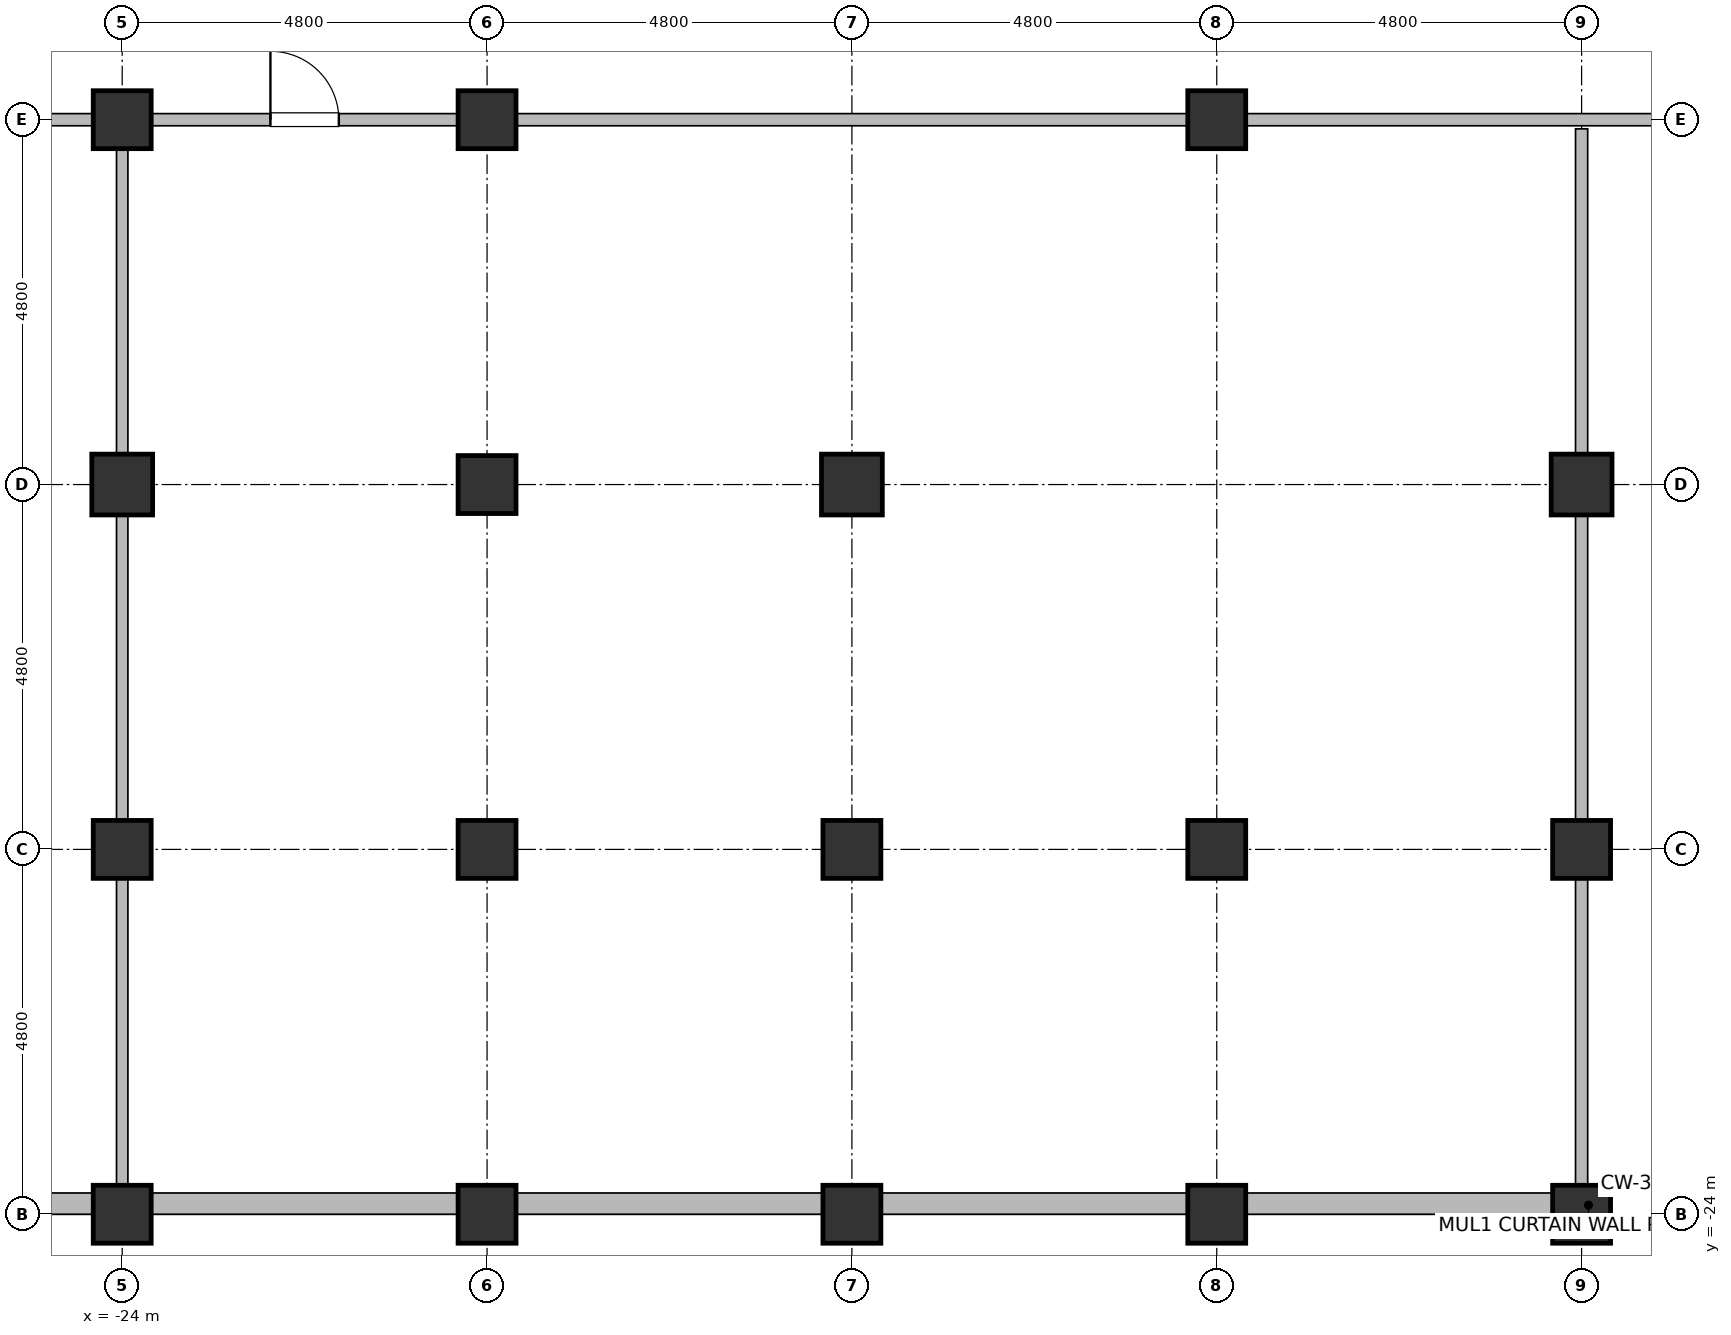
"""IFC4 building model, lengths in metres.
Left out: names, types, materials, properties, quantities, classifications, styles, units other than length and angle.
Written with IfcOpenShell. Run it as: python <this file> out.ifc"""

import sys

from ifc_helpers import new_model, si_unit, direction, frame, frame_2d, origin, origin_2d, place, context, subcontext, project, spatial, rectangle, hollow_rectangle, hollow_circle, extrude, element, fill, save


model = new_model("IFC4")
c1 = context("Model", 3, precision=1e-05, world=origin(), true_north=direction((0.0, 1.0)))
c2 = subcontext(c1, "Body", "Model", "MODEL_VIEW")
j1 = project(units=[si_unit("LENGTHUNIT", "METRE"), si_unit("PLANEANGLEUNIT", "RADIAN")], contexts=[c1])
p1 = place(None, origin())
s1 = spatial("IfcSite", under=j1, at=p1, CompositionType="ELEMENT")
p2 = place(p1, origin())
s2 = spatial("IfcBuilding", under=s1, at=p2, CompositionType="ELEMENT")
p3 = place(p2, frame((0.0, 0.0, 48.5)))
s3 = spatial("IfcBuildingStorey", under=s2, at=p3, CompositionType="ELEMENT", Elevation=48.5)
for number, where, z_axis, x_axis in (
    (1, (-24.0, -24.0, 0.0), (0.0, 0.0, 1.0), (1.0, 0.0, 0.0)),
    (2, (-24.0, -19.2, 0.0), (0.0, 0.0, 1.0), (1.0, 0.0, 0.0)),
):
    element("IfcColumn", number, at=place(p3, frame(where, z_axis=z_axis, x_axis=x_axis)), inside=s3, PredefinedType="COLUMN", context=c2, shape_type="SweptSolid", body=[
        extrude(hollow_circle(Radius=0.381, WallThickness=0.032, at=origin_2d()), origin(), (0.0, 0.0, 1.0), 3.7),
    ])
p4 = place(p3, frame((-24.0, -14.4, 0.0), z_axis=(0.0, 0.0, 1.0), x_axis=(1.0, 0.0, 0.0)))
e3 = element("IfcColumn", 3, at=p4, inside=s3, PredefinedType="COLUMN", context=c2, shape_type="SweptSolid", body=[
    extrude(hollow_rectangle(XDim=0.8, YDim=0.8, WallThickness=0.036, at=origin_2d()), origin(), (0.0, 0.0, 1.0), 3.7),
])
for number, where, z_axis, x_axis in (
    (4, (-24.0, -9.6, 0.0), (0.0, 0.0, 1.0), (1.0, 0.0, 0.0)),
    (5, (-19.2, -24.0, 0.0), (0.0, 0.0, 1.0), (1.0, 0.0, 0.0)),
    (6, (-19.2, -19.2, 0.0), (0.0, 0.0, 1.0), (1.0, 0.0, 0.0)),
    (7, (-19.2, -14.4, 0.0), (0.0, 0.0, 1.0), (1.0, 0.0, 0.0)),
    (8, (-19.2, -9.6, 0.0), (0.0, 0.0, 1.0), (1.0, 0.0, 0.0)),
    (9, (-14.4, -24.0, 0.0), (0.0, 0.0, 1.0), (1.0, 0.0, 0.0)),
    (10, (-14.4, -19.2, 0.0), (0.0, 0.0, 1.0), (1.0, 0.0, 0.0)),
):
    element("IfcColumn", number, at=place(p3, frame(where, z_axis=z_axis, x_axis=x_axis)), inside=s3, PredefinedType="COLUMN", context=c2, shape_type="SweptSolid", body=[
        extrude(hollow_circle(Radius=0.381, WallThickness=0.032, at=origin_2d()), origin(), (0.0, 0.0, 1.0), 3.7),
    ])
p5 = place(p3, frame((-14.4, -14.4, 0.0), z_axis=(0.0, 0.0, 1.0), x_axis=(1.0, 0.0, 0.0)))
e11 = element("IfcColumn", 11, at=p5, inside=s3, PredefinedType="COLUMN", context=c2, shape_type="SweptSolid", body=[
    extrude(hollow_rectangle(XDim=0.8, YDim=0.8, WallThickness=0.036, at=origin_2d()), origin(), (0.0, 0.0, 1.0), 3.7),
])
for number, where, z_axis, x_axis in (
    (12, (-9.6, -24.0, 0.0), (0.0, 0.0, 1.0), (1.0, 0.0, 0.0)),
    (13, (-9.6, -19.2, 0.0), (0.0, 0.0, 1.0), (1.0, 0.0, 0.0)),
    (14, (-9.6, -9.6, 0.0), (0.0, 0.0, 1.0), (1.0, 0.0, 0.0)),
    (15, (-4.8, -24.0, 0.0), (0.0, 0.0, 1.0), (1.0, 0.0, 0.0)),
    (16, (-4.8, -19.2, 0.0), (0.0, 0.0, 1.0), (1.0, 0.0, 0.0)),
):
    element("IfcColumn", number, at=place(p3, frame(where, z_axis=z_axis, x_axis=x_axis)), inside=s3, PredefinedType="COLUMN", context=c2, shape_type="SweptSolid", body=[
        extrude(hollow_circle(Radius=0.381, WallThickness=0.032, at=origin_2d()), origin(), (0.0, 0.0, 1.0), 3.7),
    ])
p6 = place(p3, frame((-4.8, -14.4, 0.0), z_axis=(0.0, 0.0, 1.0), x_axis=(1.0, 0.0, 0.0)))
e17 = element("IfcColumn", 17, at=p6, inside=s3, PredefinedType="COLUMN", context=c2, shape_type="SweptSolid", body=[
    extrude(hollow_rectangle(XDim=0.8, YDim=0.8, WallThickness=0.036, at=origin_2d()), origin(), (0.0, 0.0, 1.0), 3.7),
])
p7 = place(p3, frame((-30.0, -23.86, 0.0), z_axis=(0.0, 0.0, 1.0), x_axis=(1.0, 0.0, 0.0)))
e18 = element("IfcWall", 18, at=p7, inside=s3, PredefinedType="SOLIDWALL", context=c2, shape_type="SweptSolid", body=[
    extrude(rectangle(XDim=25.25, YDim=0.28, at=frame_2d((12.625, 0.0))), origin(), (0.0, 0.0, 1.0), 2.12),
])
p8 = place(p7, frame((11.798, 0.0, 0.75)))
e19 = element("IfcOpeningElement", 19, at=p8, cuts=e18, PredefinedType="OPENING", context=c2, shape_type="SweptSolid", body=[
    extrude(rectangle(XDim=1.8, YDim=1.15, at=frame_2d((0.9, 0.575))), frame((0.0, 0.155, 0.0), z_axis=(0.0, -1.0, 0.0), x_axis=(1.0, 0.0, 0.0)), (0.0, 0.0, 1.0), 0.31),
])
p9 = place(p3, frame((-33.31, -9.6, 0.0), z_axis=(0.0, 0.0, 1.0), x_axis=(1.0, 0.0, 0.0)))
e20 = element("IfcWall", 20, at=p9, inside=s3, PredefinedType="PARTITIONING", context=c2, shape_type="SweptSolid", body=[
    extrude(rectangle(XDim=61.82, YDim=0.16, at=frame_2d((30.91, 0.0))), origin(), (0.0, 0.0, 1.0), 2.62),
])
p10 = place(p9, frame((6.42, 0.0, 0.0)))
e21 = element("IfcOpeningElement", 21, at=p10, cuts=e20, PredefinedType="OPENING", context=c2, shape_type="SweptSolid", body=[
    extrude(rectangle(XDim=0.9, YDim=2.1, at=frame_2d((0.45, 1.05))), frame((0.0, 0.095, 0.0), z_axis=(0.0, -1.0, 0.0), x_axis=(1.0, 0.0, 0.0)), (0.0, 0.0, 1.0), 0.19),
])
p11 = place(p9, frame((54.5, 0.0, 0.0)))
e22 = element("IfcOpeningElement", 22, at=p11, cuts=e20, PredefinedType="OPENING", context=c2, shape_type="SweptSolid", body=[
    extrude(rectangle(XDim=0.9, YDim=2.1, at=frame_2d((0.45, 1.05))), frame((0.0, 0.095, 0.0), z_axis=(0.0, -1.0, 0.0), x_axis=(1.0, 0.0, 0.0)), (0.0, 0.0, 1.0), 0.19),
])
p12 = place(p9, frame((11.26, 0.0, 0.0)))
e23 = element("IfcOpeningElement", 23, at=p12, cuts=e20, PredefinedType="OPENING", context=c2, shape_type="SweptSolid", body=[
    extrude(rectangle(XDim=0.9, YDim=2.1, at=frame_2d((0.45, 1.05))), frame((0.0, 0.095, 0.0), z_axis=(0.0, -1.0, 0.0), x_axis=(1.0, 0.0, 0.0)), (0.0, 0.0, 1.0), 0.19),
])
p13 = place(p9, frame((30.425, 0.0, 0.0)))
e24 = element("IfcOpeningElement", 24, at=p13, cuts=e20, PredefinedType="OPENING", context=c2, shape_type="SweptSolid", body=[
    extrude(rectangle(XDim=1.05, YDim=2.2, at=frame_2d((0.525, 1.1))), frame((0.0, 0.095, 0.0), z_axis=(0.0, -1.0, 0.0), x_axis=(1.0, 0.0, 0.0)), (0.0, 0.0, 1.0), 0.19),
])
p14 = place(p9, frame((40.62, 0.0, 0.0)))
e25 = element("IfcOpeningElement", 25, at=p14, cuts=e20, PredefinedType="OPENING", context=c2, shape_type="SweptSolid", body=[
    extrude(rectangle(XDim=0.92, YDim=2.15, at=frame_2d((0.46, 1.075))), frame((0.0, 0.095, 0.0), z_axis=(0.0, -1.0, 0.0), x_axis=(1.0, 0.0, 0.0)), (0.0, 0.0, 1.0), 0.19),
])
p15 = place(p9, frame((44.28, 0.0, 0.0)))
e26 = element("IfcOpeningElement", 26, at=p15, cuts=e20, PredefinedType="OPENING", context=c2, shape_type="SweptSolid", body=[
    extrude(rectangle(XDim=0.92, YDim=2.15, at=frame_2d((0.46, 1.075))), frame((0.0, 0.095, 0.0), z_axis=(0.0, -1.0, 0.0), x_axis=(1.0, 0.0, 0.0)), (0.0, 0.0, 1.0), 0.19),
])
p16 = place(p9, frame((50.22, 0.0, 0.0)))
e27 = element("IfcOpeningElement", 27, at=p16, cuts=e20, PredefinedType="OPENING", context=c2, shape_type="SweptSolid", body=[
    extrude(rectangle(XDim=0.92, YDim=2.15, at=frame_2d((0.46, 1.075))), frame((0.0, 0.095, 0.0), z_axis=(0.0, -1.0, 0.0), x_axis=(1.0, 0.0, 0.0)), (0.0, 0.0, 1.0), 0.19),
])
p17 = place(p3, frame((-24.0, -23.71, 0.0), z_axis=(0.0, 0.0, 1.0), x_axis=(0.0, 1.0, 0.0)))
e28 = element("IfcWall", 28, at=p17, inside=s3, PredefinedType="PARTITIONING", context=c2, shape_type="SweptSolid", body=[
    extrude(rectangle(XDim=13.99, YDim=0.15, at=frame_2d((6.995, 0.0))), origin(), (0.0, 0.0, 1.0), 2.62),
])
p18 = place(p3, frame((-4.8, -23.71, 0.0), z_axis=(0.0, 0.0, 1.0), x_axis=(0.0, 1.0, 0.0)))
e29 = element("IfcWall", 29, at=p18, inside=s3, PredefinedType="PARTITIONING", context=c2, shape_type="SweptSolid", body=[
    extrude(rectangle(XDim=13.99, YDim=0.16, at=frame_2d((6.995, 0.0))), origin(), (0.0, 0.0, 1.0), 2.62),
])
p19 = place(p8, origin())
e30 = element("IfcWindow", 30, at=p19, inside=s3, PartitioningType="SINGLE_PANEL", PredefinedType="WINDOW", context=c2, shape_type="SweptSolid", body=[
    extrude(rectangle(XDim=1.8, YDim=1.15, at=frame_2d((0.9, 0.575))), frame((0.0, 0.03, 0.0), z_axis=(0.0, -1.0, 0.0), x_axis=(1.0, 0.0, 0.0)), (0.0, 0.0, 1.0), 0.06),
])
fill(e19, e30)
p20 = place(p12, origin())
e31 = element("IfcDoor", 31, at=p20, inside=s3, OperationType="SINGLE_SWING_LEFT", PredefinedType="DOOR", context=c2, shape_type="SweptSolid", body=[
    extrude(rectangle(XDim=0.9, YDim=2.1, at=frame_2d((0.45, 1.05))), frame((0.0, 0.025, 0.0), z_axis=(0.0, -1.0, 0.0), x_axis=(1.0, 0.0, 0.0)), (0.0, 0.0, 1.0), 0.05),
])
fill(e23, e31)
save(model, sys.argv[1])
